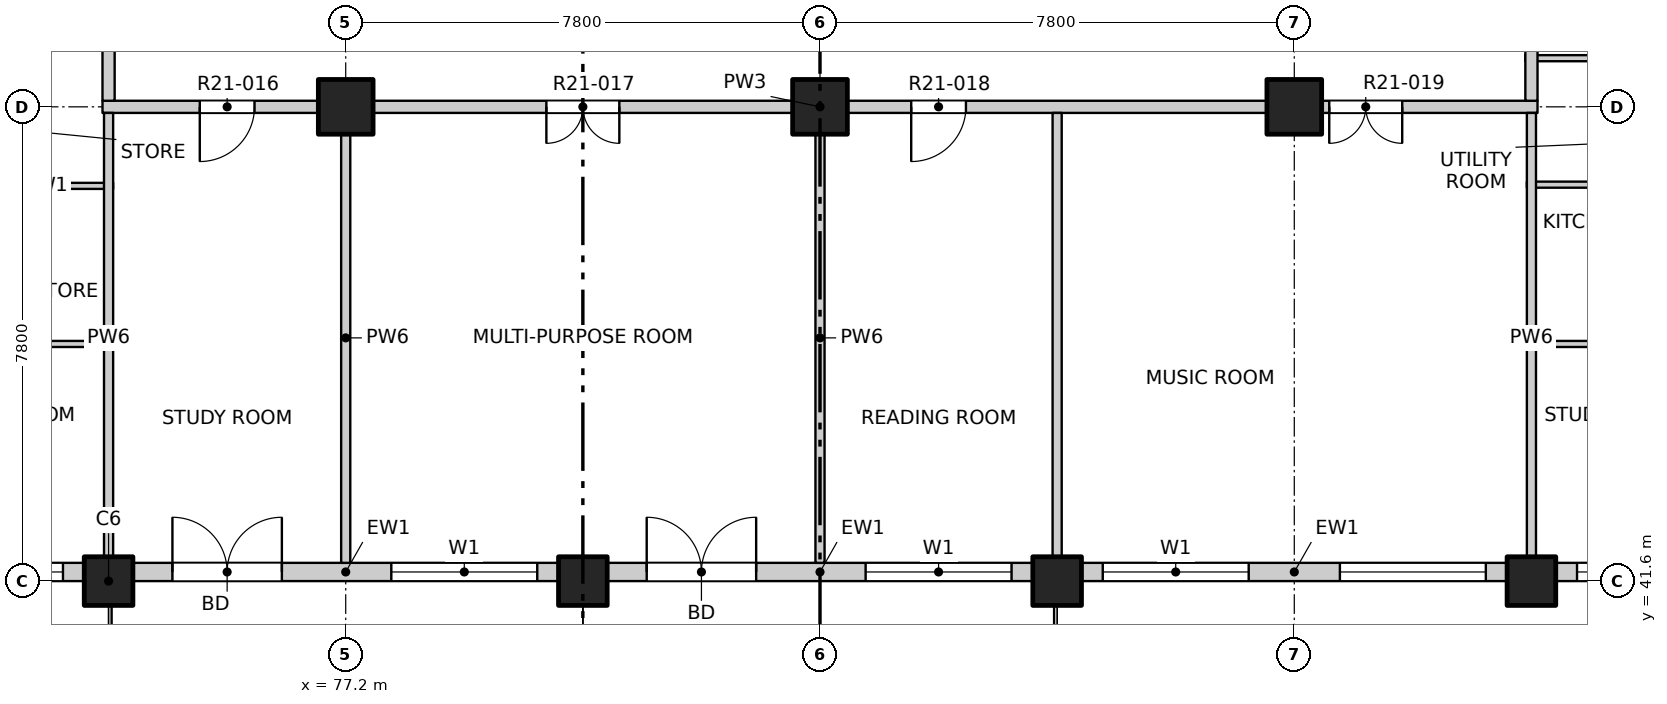
"""IFC4 building model, lengths in metres.
Left out: names, types, materials, properties, quantities, classifications, styles, units other than length and angle.
Written with IfcOpenShell. Run it as: python <this file> out.ifc"""

import sys

from ifc_helpers import new_model, si_unit, direction, frame, frame_2d, origin, origin_2d, place, context, subcontext, project, spatial, rectangle, extrude, element, fill, save


model = new_model("IFC4")
c1 = context("Model", 3, precision=1e-05, world=origin(), true_north=direction((0.0, 1.0)))
c2 = subcontext(c1, "Body", "Model", "MODEL_VIEW")
j1 = project(units=[si_unit("LENGTHUNIT", "METRE"), si_unit("PLANEANGLEUNIT", "RADIAN")], contexts=[c1])
p1 = place(None, origin())
s1 = spatial("IfcSite", under=j1, at=p1, CompositionType="ELEMENT")
p2 = place(p1, origin())
s2 = spatial("IfcBuilding", under=s1, at=p2, CompositionType="ELEMENT")
p3 = place(p2, frame((0.0, 0.0, 221.1)))
s3 = spatial("IfcBuildingStorey", under=s2, at=p3, CompositionType="ELEMENT", Elevation=221.1)
for number, where, z_axis, x_axis in (
    (1, (73.3, 41.6, -0.25), (0.0, 0.0, 1.0), (1.0, 0.0, 0.0)),
    (2, (81.1, 41.6, -0.25), (0.0, 0.0, 1.0), (1.0, 0.0, 0.0)),
    (3, (88.9, 41.6, -0.25), (0.0, 0.0, 1.0), (1.0, 0.0, 0.0)),
    (4, (96.7, 41.6, -0.25), (0.0, 0.0, 1.0), (1.0, 0.0, 0.0)),
):
    element("IfcColumn", number, at=place(p3, frame(where, z_axis=z_axis, x_axis=x_axis)), inside=s3, PredefinedType="COLUMN", context=c2, shape_type="SweptSolid", body=[
        extrude(rectangle(XDim=0.8, YDim=0.8, at=origin_2d()), origin(), (0.0, 0.0, 1.0), 3.4),
    ])
for number, where, z_axis, x_axis in (
    (5, (77.2, 49.4, -0.25), (0.0, 0.0, 1.0), (1.0, 0.0, 0.0)),
    (6, (85.0, 49.4, -0.25), (0.0, 0.0, 1.0), (1.0, 0.0, 0.0)),
    (7, (92.8, 49.4, -0.25), (0.0, 0.0, 1.0), (1.0, 0.0, 0.0)),
):
    element("IfcColumn", number, at=place(p3, frame(where, z_axis=z_axis, x_axis=x_axis)), inside=s3, PredefinedType="COLUMN", context=c2, shape_type="SweptSolid", body=[
        extrude(rectangle(XDim=0.9, YDim=0.9, at=origin_2d()), origin(), (0.0, 0.0, 1.0), 3.4),
    ])
p4 = place(p3, frame((65.5, 41.75, 0.0), z_axis=(0.0, 0.0, 1.0), x_axis=(1.0, 0.0, 0.0)))
e8 = element("IfcWall", 8, at=p4, inside=s3, PredefinedType="SOLIDWALL", context=c2, shape_type="SweptSolid", body=[
    extrude(rectangle(XDim=7.4, YDim=0.3, at=frame_2d((3.7, 0.0))), origin(), (0.0, 0.0, 1.0), 2.7),
])
p5 = place(p4, frame((0.75, 0.0, 0.9)))
e9 = element("IfcOpeningElement", 9, at=p5, cuts=e8, PredefinedType="OPENING", context=c2, shape_type="SweptSolid", body=[
    extrude(rectangle(XDim=2.4, YDim=1.8, at=frame_2d((1.2, 0.9))), frame((0.0, 0.16, 0.0), z_axis=(0.0, -1.0, 0.0), x_axis=(1.0, 0.0, 0.0)), (0.0, 0.0, 1.0), 0.32),
])
p6 = place(p4, frame((4.65, 0.0, 0.9)))
e10 = element("IfcOpeningElement", 10, at=p6, cuts=e8, PredefinedType="OPENING", context=c2, shape_type="SweptSolid", body=[
    extrude(rectangle(XDim=2.4, YDim=1.8, at=frame_2d((1.2, 0.9))), frame((0.0, 0.16, 0.0), z_axis=(0.0, -1.0, 0.0), x_axis=(1.0, 0.0, 0.0)), (0.0, 0.0, 1.0), 0.32),
])
p7 = place(p3, frame((73.7, 41.75, 0.0), z_axis=(0.0, 0.0, 1.0), x_axis=(1.0, 0.0, 0.0)))
e11 = element("IfcWall", 11, at=p7, inside=s3, PredefinedType="SOLIDWALL", context=c2, shape_type="SweptSolid", body=[
    extrude(rectangle(XDim=7.0, YDim=0.3, at=frame_2d((3.5, 0.0))), origin(), (0.0, 0.0, 1.0), 2.7),
])
p8 = place(p7, frame((0.65, 0.0, 0.0)))
e12 = element("IfcOpeningElement", 12, at=p8, cuts=e11, PredefinedType="OPENING", context=c2, shape_type="SweptSolid", body=[
    extrude(rectangle(XDim=1.8, YDim=2.4, at=frame_2d((0.9, 1.2))), frame((0.0, 0.16, 0.0), z_axis=(0.0, -1.0, 0.0), x_axis=(1.0, 0.0, 0.0)), (0.0, 0.0, 1.0), 0.32),
])
p9 = place(p7, frame((4.25, 0.0, 0.9)))
e13 = element("IfcOpeningElement", 13, at=p9, cuts=e11, PredefinedType="OPENING", context=c2, shape_type="SweptSolid", body=[
    extrude(rectangle(XDim=2.4, YDim=1.8, at=frame_2d((1.2, 0.9))), frame((0.0, 0.16, 0.0), z_axis=(0.0, -1.0, 0.0), x_axis=(1.0, 0.0, 0.0)), (0.0, 0.0, 1.0), 0.32),
])
p10 = place(p3, frame((81.5, 41.75, 0.0), z_axis=(0.0, 0.0, 1.0), x_axis=(1.0, 0.0, 0.0)))
e14 = element("IfcWall", 14, at=p10, inside=s3, PredefinedType="SOLIDWALL", context=c2, shape_type="SweptSolid", body=[
    extrude(rectangle(XDim=7.0, YDim=0.3, at=frame_2d((3.5, 0.0))), origin(), (0.0, 0.0, 1.0), 2.7),
])
p11 = place(p10, frame((0.65, 0.0, 0.0)))
e15 = element("IfcOpeningElement", 15, at=p11, cuts=e14, PredefinedType="OPENING", context=c2, shape_type="SweptSolid", body=[
    extrude(rectangle(XDim=1.8, YDim=2.4, at=frame_2d((0.9, 1.2))), frame((0.0, 0.16, 0.0), z_axis=(0.0, -1.0, 0.0), x_axis=(1.0, 0.0, 0.0)), (0.0, 0.0, 1.0), 0.32),
])
p12 = place(p10, frame((4.25, 0.0, 0.9)))
e16 = element("IfcOpeningElement", 16, at=p12, cuts=e14, PredefinedType="OPENING", context=c2, shape_type="SweptSolid", body=[
    extrude(rectangle(XDim=2.4, YDim=1.8, at=frame_2d((1.2, 0.9))), frame((0.0, 0.16, 0.0), z_axis=(0.0, -1.0, 0.0), x_axis=(1.0, 0.0, 0.0)), (0.0, 0.0, 1.0), 0.32),
])
p13 = place(p3, frame((89.3, 41.75, 0.0), z_axis=(0.0, 0.0, 1.0), x_axis=(1.0, 0.0, 0.0)))
e17 = element("IfcWall", 17, at=p13, inside=s3, PredefinedType="SOLIDWALL", context=c2, shape_type="SweptSolid", body=[
    extrude(rectangle(XDim=7.0, YDim=0.3, at=frame_2d((3.5, 0.0))), origin(), (0.0, 0.0, 1.0), 2.7),
])
p14 = place(p13, frame((0.35, 0.0, 0.9)))
e18 = element("IfcOpeningElement", 18, at=p14, cuts=e17, PredefinedType="OPENING", context=c2, shape_type="SweptSolid", body=[
    extrude(rectangle(XDim=2.4, YDim=1.8, at=frame_2d((1.2, 0.9))), frame((0.0, 0.16, 0.0), z_axis=(0.0, -1.0, 0.0), x_axis=(1.0, 0.0, 0.0)), (0.0, 0.0, 1.0), 0.32),
])
p15 = place(p13, frame((4.25, 0.0, 0.9)))
e19 = element("IfcOpeningElement", 19, at=p15, cuts=e17, PredefinedType="OPENING", context=c2, shape_type="SweptSolid", body=[
    extrude(rectangle(XDim=2.4, YDim=1.8, at=frame_2d((1.2, 0.9))), frame((0.0, 0.16, 0.0), z_axis=(0.0, -1.0, 0.0), x_axis=(1.0, 0.0, 0.0)), (0.0, 0.0, 1.0), 0.32),
])
p16 = place(p3, frame((97.1, 41.75, 0.0), z_axis=(0.0, 0.0, 1.0), x_axis=(1.0, 0.0, 0.0)))
e20 = element("IfcWall", 20, at=p16, inside=s3, PredefinedType="SOLIDWALL", context=c2, shape_type="SweptSolid", body=[
    extrude(rectangle(XDim=7.4, YDim=0.3, at=frame_2d((3.7, 0.0))), origin(), (0.0, 0.0, 1.0), 2.7),
])
p17 = place(p16, frame((0.35, 0.0, 0.9)))
e21 = element("IfcOpeningElement", 21, at=p17, cuts=e20, PredefinedType="OPENING", context=c2, shape_type="SweptSolid", body=[
    extrude(rectangle(XDim=2.4, YDim=1.8, at=frame_2d((1.2, 0.9))), frame((0.0, 0.16, 0.0), z_axis=(0.0, -1.0, 0.0), x_axis=(1.0, 0.0, 0.0)), (0.0, 0.0, 1.0), 0.32),
])
p18 = place(p16, frame((4.25, 0.0, 0.9)))
e22 = element("IfcOpeningElement", 22, at=p18, cuts=e20, PredefinedType="OPENING", context=c2, shape_type="SweptSolid", body=[
    extrude(rectangle(XDim=2.4, YDim=1.8, at=frame_2d((1.2, 0.9))), frame((0.0, 0.16, 0.0), z_axis=(0.0, -1.0, 0.0), x_axis=(1.0, 0.0, 0.0)), (0.0, 0.0, 1.0), 0.32),
])
p19 = place(p3, frame((61.9, 45.5, 0.0), z_axis=(0.0, 0.0, 1.0), x_axis=(1.0, 0.0, 0.0)))
e23 = element("IfcWall", 23, at=p19, inside=s3, PredefinedType="PARTITIONING", context=c2, shape_type="SweptSolid", body=[
    extrude(rectangle(XDim=11.475, YDim=0.1, at=frame_2d((5.737, 0.0))), origin(), (0.0, 0.0, 1.0), 3.15),
])
p20 = place(p19, frame((7.965, 0.0, 0.0)))
e24 = element("IfcOpeningElement", 24, at=p20, cuts=e23, PredefinedType="OPENING", context=c2, shape_type="SweptSolid", body=[
    extrude(rectangle(XDim=0.9, YDim=2.1, at=frame_2d((0.45, 1.05))), frame((0.0, 0.06, 0.0), z_axis=(0.0, -1.0, 0.0), x_axis=(1.0, 0.0, 0.0)), (0.0, 0.0, 1.0), 0.12),
])
p21 = place(p3, frame((96.625, 45.5, 0.0), z_axis=(0.0, 0.0, 1.0), x_axis=(1.0, 0.0, 0.0)))
e25 = element("IfcWall", 25, at=p21, inside=s3, PredefinedType="PARTITIONING", context=c2, shape_type="SweptSolid", body=[
    extrude(rectangle(XDim=11.475, YDim=0.1, at=frame_2d((5.738, 0.0))), origin(), (0.0, 0.0, 1.0), 3.15),
])
p22 = place(p21, frame((2.61, 0.0, 0.0)))
e26 = element("IfcOpeningElement", 26, at=p22, cuts=e25, PredefinedType="OPENING", context=c2, shape_type="SweptSolid", body=[
    extrude(rectangle(XDim=0.9, YDim=2.1, at=frame_2d((0.45, 1.05))), frame((0.0, 0.06, 0.0), z_axis=(0.0, -1.0, 0.0), x_axis=(1.0, 0.0, 0.0)), (0.0, 0.0, 1.0), 0.12),
])
p23 = place(p3, frame((71.18, 48.1, 0.0), z_axis=(0.0, 0.0, 1.0), x_axis=(1.0, 0.0, 0.0)))
e27 = element("IfcWall", 27, at=p23, inside=s3, PredefinedType="PARTITIONING", context=c2, shape_type="SweptSolid", body=[
    extrude(rectangle(XDim=2.195, YDim=0.1, at=frame_2d((1.097, 0.0))), origin(), (0.0, 0.0, 1.0), 3.15),
])
p24 = place(p3, frame((96.625, 48.12, 0.0), z_axis=(0.0, 0.0, 1.0), x_axis=(1.0, 0.0, 0.0)))
e28 = element("IfcWall", 28, at=p24, inside=s3, PredefinedType="PARTITIONING", context=c2, shape_type="SweptSolid", body=[
    extrude(rectangle(XDim=2.195, YDim=0.1, at=frame_2d((1.098, 0.0))), origin(), (0.0, 0.0, 1.0), 3.15),
])
p25 = place(p3, frame((73.2, 49.4, 0.0), z_axis=(0.0, 0.0, 1.0), x_axis=(1.0, 0.0, 0.0)))
e29 = element("IfcWall", 29, at=p25, inside=s3, PredefinedType="PARTITIONING", context=c2, shape_type="SweptSolid", body=[
    extrude(rectangle(XDim=23.6, YDim=0.2, at=frame_2d((11.8, 0.0))), origin(), (0.0, 0.0, 1.0), 3.15),
])
p26 = place(p25, frame((1.6, 0.0, 0.0)))
e30 = element("IfcOpeningElement", 30, at=p26, cuts=e29, PredefinedType="OPENING", context=c2, shape_type="SweptSolid", body=[
    extrude(rectangle(XDim=0.9, YDim=2.1, at=frame_2d((0.45, 1.05))), frame((0.0, 0.11, 0.0), z_axis=(0.0, -1.0, 0.0), x_axis=(1.0, 0.0, 0.0)), (0.0, 0.0, 1.0), 0.22),
])
p27 = place(p25, frame((7.3, 0.0, 0.0)))
e31 = element("IfcOpeningElement", 31, at=p27, cuts=e29, PredefinedType="OPENING", context=c2, shape_type="SweptSolid", body=[
    extrude(rectangle(XDim=1.2, YDim=2.1, at=frame_2d((0.6, 1.05))), frame((0.0, 0.11, 0.0), z_axis=(0.0, -1.0, 0.0), x_axis=(1.0, 0.0, 0.0)), (0.0, 0.0, 1.0), 0.22),
])
p28 = place(p25, frame((13.3, 0.0, 0.0)))
e32 = element("IfcOpeningElement", 32, at=p28, cuts=e29, PredefinedType="OPENING", context=c2, shape_type="SweptSolid", body=[
    extrude(rectangle(XDim=0.9, YDim=2.1, at=frame_2d((0.45, 1.05))), frame((0.0, 0.11, 0.0), z_axis=(0.0, -1.0, 0.0), x_axis=(1.0, 0.0, 0.0)), (0.0, 0.0, 1.0), 0.22),
])
p29 = place(p25, frame((20.175, 0.0, 0.0)))
e33 = element("IfcOpeningElement", 33, at=p29, cuts=e29, PredefinedType="OPENING", context=c2, shape_type="SweptSolid", body=[
    extrude(rectangle(XDim=1.2, YDim=2.1, at=frame_2d((0.6, 1.05))), frame((0.0, 0.11, 0.0), z_axis=(0.0, -1.0, 0.0), x_axis=(1.0, 0.0, 0.0)), (0.0, 0.0, 1.0), 0.22),
])
p30 = place(p3, frame((96.6, 50.2, 0.0), z_axis=(0.0, 0.0, 1.0), x_axis=(1.0, 0.0, 0.0)))
e34 = element("IfcWall", 34, at=p30, inside=s3, PredefinedType="PARTITIONING", context=c2, shape_type="SweptSolid", body=[
    extrude(rectangle(XDim=2.22, YDim=0.1, at=frame_2d((1.11, 0.0))), origin(), (0.0, 0.0, 1.0), 3.15),
])
p31 = place(p3, frame((73.3, 41.9, 0.0), z_axis=(0.0, 0.0, 1.0), x_axis=(0.0, 1.0, 0.0)))
e35 = element("IfcWall", 35, at=p31, inside=s3, PredefinedType="PARTITIONING", context=c2, shape_type="SweptSolid", body=[
    extrude(rectangle(XDim=7.4, YDim=0.15, at=frame_2d((3.7, 0.0))), origin(), (0.0, 0.0, 1.0), 3.15),
])
p32 = place(p3, frame((73.3, 49.5, 0.0), z_axis=(0.0, 0.0, 1.0), x_axis=(0.0, 1.0, 0.0)))
e36 = element("IfcWall", 36, at=p32, inside=s3, PredefinedType="PARTITIONING", context=c2, shape_type="SweptSolid", body=[
    extrude(rectangle(XDim=34.9, YDim=0.2, at=frame_2d((17.45, 0.0))), origin(), (0.0, 0.0, 1.0), 3.15),
])
p33 = place(p32, frame((3.325, 0.0, 0.0)))
e37 = element("IfcOpeningElement", 37, at=p33, cuts=e36, PredefinedType="OPENING", context=c2, shape_type="SweptSolid", body=[
    extrude(rectangle(XDim=1.0, YDim=2.1, at=frame_2d((0.5, 1.05))), frame((0.0, 0.11, 0.0), z_axis=(0.0, -1.0, 0.0), x_axis=(1.0, 0.0, 0.0)), (0.0, 0.0, 1.0), 0.22),
])
p34 = place(p32, frame((18.875, 0.0, 0.0)))
e38 = element("IfcOpeningElement", 38, at=p34, cuts=e36, PredefinedType="OPENING", context=c2, shape_type="SweptSolid", body=[
    extrude(rectangle(XDim=1.0, YDim=2.1, at=frame_2d((0.5, 1.05))), frame((0.0, 0.11, 0.0), z_axis=(0.0, -1.0, 0.0), x_axis=(1.0, 0.0, 0.0)), (0.0, 0.0, 1.0), 0.22),
])
p35 = place(p32, frame((29.325, 0.0, 0.0)))
e39 = element("IfcOpeningElement", 39, at=p35, cuts=e36, PredefinedType="OPENING", context=c2, shape_type="SweptSolid", body=[
    extrude(rectangle(XDim=1.0, YDim=2.1, at=frame_2d((0.5, 1.05))), frame((0.0, 0.11, 0.0), z_axis=(0.0, -1.0, 0.0), x_axis=(1.0, 0.0, 0.0)), (0.0, 0.0, 1.0), 0.22),
])
for number, where, z_axis, x_axis in (
    (40, (77.2, 41.9, 0.0), (0.0, 0.0, 1.0), (0.0, 1.0, 0.0)),
    (41, (85.0, 41.9, 0.0), (0.0, 0.0, 1.0), (0.0, 1.0, 0.0)),
):
    element("IfcWall", number, at=place(p3, frame(where, z_axis=z_axis, x_axis=x_axis)), inside=s3, PredefinedType="PARTITIONING", context=c2, shape_type="SweptSolid", body=[
        extrude(rectangle(XDim=7.4, YDim=0.15, at=frame_2d((3.7, 0.0))), origin(), (0.0, 0.0, 1.0), 3.15),
    ])
p36 = place(p3, frame((88.9, 41.9, 0.0), z_axis=(0.0, 0.0, 1.0), x_axis=(0.0, 1.0, 0.0)))
e42 = element("IfcWall", 42, at=p36, inside=s3, PredefinedType="PARTITIONING", context=c2, shape_type="SweptSolid", body=[
    extrude(rectangle(XDim=7.4, YDim=0.15, at=frame_2d((3.7, 0.0))), origin(), (0.0, 0.0, 1.0), 2.55),
])
p37 = place(p3, frame((96.7, 41.9, 0.0), z_axis=(0.0, 0.0, 1.0), x_axis=(0.0, 1.0, 0.0)))
e43 = element("IfcWall", 43, at=p37, inside=s3, PredefinedType="PARTITIONING", context=c2, shape_type="SweptSolid", body=[
    extrude(rectangle(XDim=7.4, YDim=0.15, at=frame_2d((3.7, 0.0))), origin(), (0.0, 0.0, 1.0), 3.15),
])
p38 = place(p3, frame((96.7, 49.5, 0.0), z_axis=(0.0, 0.0, 1.0), x_axis=(0.0, 1.0, 0.0)))
e44 = element("IfcWall", 44, at=p38, inside=s3, PredefinedType="PARTITIONING", context=c2, shape_type="SweptSolid", body=[
    extrude(rectangle(XDim=34.9, YDim=0.2, at=frame_2d((17.45, 0.0))), origin(), (0.0, 0.0, 1.0), 3.15),
])
p39 = place(p38, frame((3.275, 0.0, 0.0)))
e45 = element("IfcOpeningElement", 45, at=p39, cuts=e44, PredefinedType="OPENING", context=c2, shape_type="SweptSolid", body=[
    extrude(rectangle(XDim=1.0, YDim=2.1, at=frame_2d((0.5, 1.05))), frame((0.0, 0.11, 0.0), z_axis=(0.0, -1.0, 0.0), x_axis=(1.0, 0.0, 0.0)), (0.0, 0.0, 1.0), 0.22),
])
p40 = place(p38, frame((10.825, 0.0, 0.0)))
e46 = element("IfcOpeningElement", 46, at=p40, cuts=e44, PredefinedType="OPENING", context=c2, shape_type="SweptSolid", body=[
    extrude(rectangle(XDim=1.0, YDim=2.1, at=frame_2d((0.5, 1.05))), frame((0.0, 0.11, 0.0), z_axis=(0.0, -1.0, 0.0), x_axis=(1.0, 0.0, 0.0)), (0.0, 0.0, 1.0), 0.22),
])
p41 = place(p38, frame((21.575, 0.0, 0.0)))
e47 = element("IfcOpeningElement", 47, at=p41, cuts=e44, PredefinedType="OPENING", context=c2, shape_type="SweptSolid", body=[
    extrude(rectangle(XDim=1.0, YDim=2.1, at=frame_2d((0.5, 1.05))), frame((0.0, 0.11, 0.0), z_axis=(0.0, -1.0, 0.0), x_axis=(1.0, 0.0, 0.0)), (0.0, 0.0, 1.0), 0.22),
])
p42 = place(p38, frame((30.575, 0.0, 0.0)))
e48 = element("IfcOpeningElement", 48, at=p42, cuts=e44, PredefinedType="OPENING", context=c2, shape_type="SweptSolid", body=[
    extrude(rectangle(XDim=1.0, YDim=2.1, at=frame_2d((0.5, 1.05))), frame((0.0, 0.11, 0.0), z_axis=(0.0, -1.0, 0.0), x_axis=(1.0, 0.0, 0.0)), (0.0, 0.0, 1.0), 0.22),
])
p43 = place(p6, origin())
e49 = element("IfcWindow", 49, at=p43, inside=s3, PartitioningType="DOUBLE_PANEL_VERTICAL", PredefinedType="WINDOW", context=c2, shape_type="SweptSolid", body=[
    extrude(rectangle(XDim=2.4, YDim=1.8, at=frame_2d((1.2, 0.9))), frame((0.0, 0.03, 0.0), z_axis=(0.0, -1.0, 0.0), x_axis=(1.0, 0.0, 0.0)), (0.0, 0.0, 1.0), 0.06),
])
fill(e10, e49)
p44 = place(p8, origin())
e50 = element("IfcDoor", 50, at=p44, inside=s3, OperationType="DOUBLE_DOOR_SINGLE_SWING", PredefinedType="DOOR", context=c2, shape_type="SweptSolid", body=[
    extrude(rectangle(XDim=1.8, YDim=2.4, at=frame_2d((0.9, 1.2))), frame((0.0, 0.025, 0.0), z_axis=(0.0, -1.0, 0.0), x_axis=(1.0, 0.0, 0.0)), (0.0, 0.0, 1.0), 0.05),
])
fill(e12, e50)
p45 = place(p9, origin())
e51 = element("IfcWindow", 51, at=p45, inside=s3, PartitioningType="DOUBLE_PANEL_VERTICAL", PredefinedType="WINDOW", context=c2, shape_type="SweptSolid", body=[
    extrude(rectangle(XDim=2.4, YDim=1.8, at=frame_2d((1.2, 0.9))), frame((0.0, 0.03, 0.0), z_axis=(0.0, -1.0, 0.0), x_axis=(1.0, 0.0, 0.0)), (0.0, 0.0, 1.0), 0.06),
])
fill(e13, e51)
p46 = place(p11, origin())
e52 = element("IfcDoor", 52, at=p46, inside=s3, OperationType="DOUBLE_DOOR_SINGLE_SWING", PredefinedType="DOOR", context=c2, shape_type="SweptSolid", body=[
    extrude(rectangle(XDim=1.8, YDim=2.4, at=frame_2d((0.9, 1.2))), frame((0.0, 0.025, 0.0), z_axis=(0.0, -1.0, 0.0), x_axis=(1.0, 0.0, 0.0)), (0.0, 0.0, 1.0), 0.05),
])
fill(e15, e52)
p47 = place(p12, origin())
e53 = element("IfcWindow", 53, at=p47, inside=s3, PartitioningType="DOUBLE_PANEL_VERTICAL", PredefinedType="WINDOW", context=c2, shape_type="SweptSolid", body=[
    extrude(rectangle(XDim=2.4, YDim=1.8, at=frame_2d((1.2, 0.9))), frame((0.0, 0.03, 0.0), z_axis=(0.0, -1.0, 0.0), x_axis=(1.0, 0.0, 0.0)), (0.0, 0.0, 1.0), 0.06),
])
fill(e16, e53)
p48 = place(p14, origin())
e54 = element("IfcWindow", 54, at=p48, inside=s3, PartitioningType="DOUBLE_PANEL_VERTICAL", PredefinedType="WINDOW", context=c2, shape_type="SweptSolid", body=[
    extrude(rectangle(XDim=2.4, YDim=1.8, at=frame_2d((1.2, 0.9))), frame((0.0, 0.03, 0.0), z_axis=(0.0, -1.0, 0.0), x_axis=(1.0, 0.0, 0.0)), (0.0, 0.0, 1.0), 0.06),
])
fill(e18, e54)
p49 = place(p15, origin())
e55 = element("IfcWindow", 55, at=p49, inside=s3, PartitioningType="DOUBLE_PANEL_VERTICAL", PredefinedType="WINDOW", context=c2, shape_type="SweptSolid", body=[
    extrude(rectangle(XDim=2.4, YDim=1.8, at=frame_2d((1.2, 0.9))), frame((0.0, 0.03, 0.0), z_axis=(0.0, -1.0, 0.0), x_axis=(1.0, 0.0, 0.0)), (0.0, 0.0, 1.0), 0.06),
])
fill(e19, e55)
p50 = place(p17, origin())
e56 = element("IfcWindow", 56, at=p50, inside=s3, PartitioningType="DOUBLE_PANEL_VERTICAL", PredefinedType="WINDOW", context=c2, shape_type="SweptSolid", body=[
    extrude(rectangle(XDim=2.4, YDim=1.8, at=frame_2d((1.2, 0.9))), frame((0.0, 0.03, 0.0), z_axis=(0.0, -1.0, 0.0), x_axis=(1.0, 0.0, 0.0)), (0.0, 0.0, 1.0), 0.06),
])
fill(e21, e56)
p51 = place(p26, origin())
e57 = element("IfcDoor", 57, at=p51, inside=s3, OperationType="SINGLE_SWING_RIGHT", PredefinedType="DOOR", context=c2, shape_type="SweptSolid", body=[
    extrude(rectangle(XDim=0.9, YDim=2.1, at=frame_2d((0.45, 1.05))), frame((0.0, 0.025, 0.0), z_axis=(0.0, -1.0, 0.0), x_axis=(1.0, 0.0, 0.0)), (0.0, 0.0, 1.0), 0.05),
])
fill(e30, e57)
p52 = place(p27, origin())
e58 = element("IfcDoor", 58, at=p52, inside=s3, OperationType="DOUBLE_DOOR_SINGLE_SWING", PredefinedType="DOOR", context=c2, shape_type="SweptSolid", body=[
    extrude(rectangle(XDim=1.2, YDim=2.1, at=frame_2d((0.6, 1.05))), frame((0.0, 0.025, 0.0), z_axis=(0.0, -1.0, 0.0), x_axis=(1.0, 0.0, 0.0)), (0.0, 0.0, 1.0), 0.05),
])
fill(e31, e58)
p53 = place(p28, origin())
e59 = element("IfcDoor", 59, at=p53, inside=s3, OperationType="SINGLE_SWING_RIGHT", PredefinedType="DOOR", context=c2, shape_type="SweptSolid", body=[
    extrude(rectangle(XDim=0.9, YDim=2.1, at=frame_2d((0.45, 1.05))), frame((0.0, 0.025, 0.0), z_axis=(0.0, -1.0, 0.0), x_axis=(1.0, 0.0, 0.0)), (0.0, 0.0, 1.0), 0.05),
])
fill(e32, e59)
p54 = place(p29, origin())
e60 = element("IfcDoor", 60, at=p54, inside=s3, OperationType="DOUBLE_DOOR_SINGLE_SWING", PredefinedType="DOOR", context=c2, shape_type="SweptSolid", body=[
    extrude(rectangle(XDim=1.2, YDim=2.1, at=frame_2d((0.6, 1.05))), frame((0.0, 0.025, 0.0), z_axis=(0.0, -1.0, 0.0), x_axis=(1.0, 0.0, 0.0)), (0.0, 0.0, 1.0), 0.05),
])
fill(e33, e60)
save(model, sys.argv[1])
